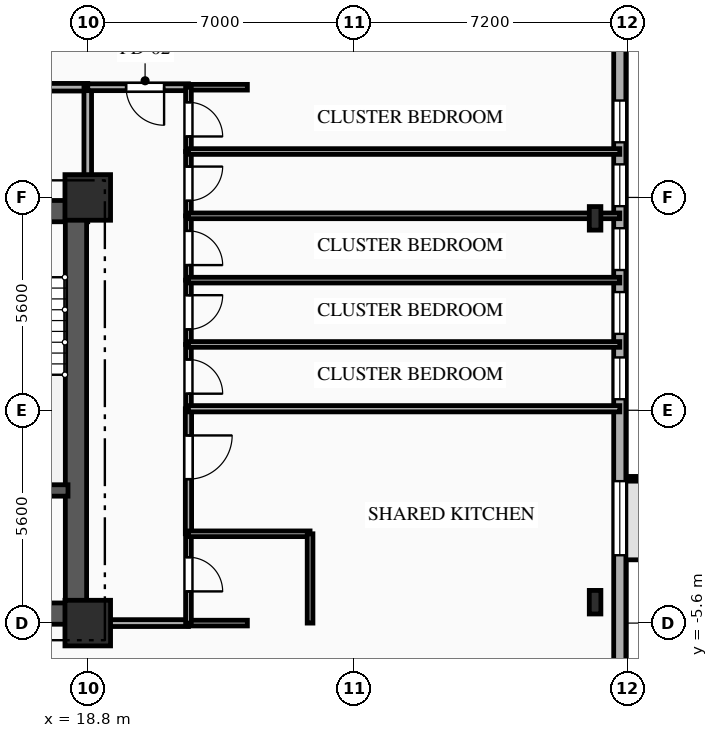
"""IFC4 building model, lengths in metres.
Left out: names, types, materials, properties, quantities, classifications, styles, units other than length and angle.
Written with IfcOpenShell. Run it as: python <this file> out.ifc"""

import sys

from ifc_helpers import new_model, si_unit, direction, frame, frame_2d, origin, origin_2d, place, context, subcontext, project, spatial, rectangle, i_section, extrude, element, fill, save


model = new_model("IFC4")
c1 = context("Model", 3, precision=1e-05, world=origin(), true_north=direction((0.0, 1.0)))
c2 = subcontext(c1, "Body", "Model", "MODEL_VIEW")
j1 = project(units=[si_unit("LENGTHUNIT", "METRE"), si_unit("PLANEANGLEUNIT", "RADIAN")], contexts=[c1])
p1 = place(None, origin())
s1 = spatial("IfcSite", under=j1, at=p1, CompositionType="ELEMENT")
p2 = place(p1, origin())
s2 = spatial("IfcBuilding", under=s1, at=p2, CompositionType="ELEMENT")
p3 = place(p2, frame((0.0, 0.0, 30.35)))
s3 = spatial("IfcBuildingStorey", under=s2, at=p3, CompositionType="ELEMENT", Elevation=30.35)
for number, where, z_axis, x_axis in (
    (1, (18.8, -5.6, 0.0), (0.0, 0.0, 1.0), (1.0, 0.0, 0.0)),
    (2, (18.8, 5.6, 0.0), (0.0, 0.0, 1.0), (1.0, 0.0, 0.0)),
):
    element("IfcColumn", number, at=place(p3, frame(where, z_axis=z_axis, x_axis=x_axis)), inside=s3, PredefinedType="COLUMN", context=c2, shape_type="SweptSolid", body=[
        extrude(rectangle(XDim=1.2, YDim=1.2, at=origin_2d()), origin(), (0.0, 0.0, 1.0), 3.35),
    ])
for number, where, z_axis, x_axis in (
    (3, (32.15, -5.05, 0.0), (0.0, 0.0, 1.0), (1.0, 0.0, 0.0)),
    (4, (32.15, 5.05, 0.0), (0.0, 0.0, 1.0), (1.0, 0.0, 0.0)),
):
    element("IfcColumn", number, at=place(p3, frame(where, z_axis=z_axis, x_axis=x_axis)), inside=s3, PredefinedType="COLUMN", context=c2, shape_type="SweptSolid", body=[
        extrude(i_section(OverallWidth=0.305, OverallDepth=0.62, WebThickness=0.021, FlangeThickness=0.04, FilletRadius=0.027, at=origin_2d()), origin(), (0.0, 0.0, 1.0), 3.35),
    ])
p4 = place(p3, frame((32.8, 15.8, 0.0), z_axis=(0.0, 0.0, 1.0), x_axis=(0.0, -1.0, 0.0)))
e5 = element("IfcWall", 5, at=p4, inside=s3, PredefinedType="SOLIDWALL", context=c2, shape_type="SweptSolid", body=[
    extrude(rectangle(XDim=31.6, YDim=0.32, at=frame_2d((15.8, 0.0))), origin(), (0.0, 0.0, 1.0), 3.035),
])
p5 = place(p4, frame((7.65, 0.0, 0.85)))
e6 = element("IfcOpeningElement", 6, at=p5, cuts=e5, PredefinedType="OPENING", context=c2, shape_type="SweptSolid", body=[
    extrude(rectangle(XDim=1.1, YDim=1.85, at=frame_2d((0.55, 0.925))), frame((0.0, 0.17, 0.0), z_axis=(0.0, -1.0, 0.0), x_axis=(1.0, 0.0, 0.0)), (0.0, 0.0, 1.0), 0.34),
])
p6 = place(p4, frame((9.33, 0.0, 0.85)))
e7 = element("IfcOpeningElement", 7, at=p6, cuts=e5, PredefinedType="OPENING", context=c2, shape_type="SweptSolid", body=[
    extrude(rectangle(XDim=1.1, YDim=1.85, at=frame_2d((0.55, 0.925))), frame((0.0, 0.17, 0.0), z_axis=(0.0, -1.0, 0.0), x_axis=(1.0, 0.0, 0.0)), (0.0, 0.0, 1.0), 0.34),
])
p7 = place(p4, frame((11.01, 0.0, 0.85)))
e8 = element("IfcOpeningElement", 8, at=p7, cuts=e5, PredefinedType="OPENING", context=c2, shape_type="SweptSolid", body=[
    extrude(rectangle(XDim=1.1, YDim=1.85, at=frame_2d((0.55, 0.925))), frame((0.0, 0.17, 0.0), z_axis=(0.0, -1.0, 0.0), x_axis=(1.0, 0.0, 0.0)), (0.0, 0.0, 1.0), 0.34),
])
p8 = place(p4, frame((12.69, 0.0, 0.85)))
e9 = element("IfcOpeningElement", 9, at=p8, cuts=e5, PredefinedType="OPENING", context=c2, shape_type="SweptSolid", body=[
    extrude(rectangle(XDim=1.1, YDim=1.85, at=frame_2d((0.55, 0.925))), frame((0.0, 0.17, 0.0), z_axis=(0.0, -1.0, 0.0), x_axis=(1.0, 0.0, 0.0)), (0.0, 0.0, 1.0), 0.34),
])
p9 = place(p4, frame((14.41, 0.0, 0.85)))
e10 = element("IfcOpeningElement", 10, at=p9, cuts=e5, PredefinedType="OPENING", context=c2, shape_type="SweptSolid", body=[
    extrude(rectangle(XDim=1.1, YDim=1.85, at=frame_2d((0.55, 0.925))), frame((0.0, 0.17, 0.0), z_axis=(0.0, -1.0, 0.0), x_axis=(1.0, 0.0, 0.0)), (0.0, 0.0, 1.0), 0.34),
])
p10 = place(p4, frame((17.665, 0.0, 0.85)))
e11 = element("IfcOpeningElement", 11, at=p10, cuts=e5, PredefinedType="OPENING", context=c2, shape_type="SweptSolid", body=[
    extrude(rectangle(XDim=1.95, YDim=1.85, at=frame_2d((0.975, 0.925))), frame((0.0, 0.17, 0.0), z_axis=(0.0, -1.0, 0.0), x_axis=(1.0, 0.0, 0.0)), (0.0, 0.0, 1.0), 0.34),
])
p11 = place(p3, frame((9.2, 5.24, 0.0), z_axis=(0.0, 0.0, 1.0), x_axis=(1.0, 0.0, 0.0)))
e12 = element("IfcWall", 12, at=p11, inside=s3, PredefinedType="SHEAR", context=c2, shape_type="SweptSolid", body=[
    extrude(rectangle(XDim=9.6, YDim=0.56, at=frame_2d((4.8, 0.0))), origin(), (0.0, 0.0, 1.0), 3.035),
])
p12 = place(p11, frame((6.95, 0.0, 0.0)))
e13 = element("IfcOpeningElement", 13, at=p12, cuts=e12, PredefinedType="OPENING", context=c2, shape_type="SweptSolid", body=[
    extrude(rectangle(XDim=1.1, YDim=2.15, at=frame_2d((0.55, 1.075))), frame((0.0, 0.29, 0.0), z_axis=(0.0, -1.0, 0.0), x_axis=(1.0, 0.0, 0.0)), (0.0, 0.0, 1.0), 0.58),
])
p13 = place(p11, frame((3.775, 0.0, 0.0)))
e14 = element("IfcOpeningElement", 14, at=p13, cuts=e12, PredefinedType="OPENING", context=c2, shape_type="SweptSolid", body=[
    extrude(rectangle(XDim=1.05, YDim=2.1, at=frame_2d((0.525, 1.05))), frame((0.0, 0.29, 0.0), z_axis=(0.0, -1.0, 0.0), x_axis=(1.0, 0.0, 0.0)), (0.0, 0.0, 1.0), 0.58),
])
p14 = place(p3, frame((9.2, -5.35, 0.0), z_axis=(0.0, 0.0, 1.0), x_axis=(1.0, 0.0, 0.0)))
e15 = element("IfcWall", 15, at=p14, inside=s3, PredefinedType="SHEAR", context=c2, shape_type="SweptSolid", body=[
    extrude(rectangle(XDim=9.6, YDim=0.56, at=frame_2d((4.8, 0.0))), origin(), (0.0, 0.0, 1.0), 3.035),
])
p15 = place(p14, frame((7.65, 0.0, 0.0)))
e16 = element("IfcOpeningElement", 16, at=p15, cuts=e15, PredefinedType="OPENING", context=c2, shape_type="SweptSolid", body=[
    extrude(rectangle(XDim=0.9, YDim=2.1, at=frame_2d((0.45, 1.05))), frame((0.0, 0.29, 0.0), z_axis=(0.0, -1.0, 0.0), x_axis=(1.0, 0.0, 0.0)), (0.0, 0.0, 1.0), 0.58),
])
p16 = place(p3, frame((18.49, -5.05, 0.0), z_axis=(0.0, 0.0, 1.0), x_axis=(0.0, 1.0, 0.0)))
e17 = element("IfcWall", 17, at=p16, inside=s3, PredefinedType="SHEAR", context=c2, shape_type="SweptSolid", body=[
    extrude(rectangle(XDim=10.1, YDim=0.56, at=frame_2d((5.05, 0.0))), origin(), (0.0, 0.0, 1.0), 3.035),
])
p17 = place(p3, frame((15.1, -2.11, 0.0), z_axis=(0.0, 0.0, 1.0), x_axis=(1.0, 0.0, 0.0)))
e18 = element("IfcWall", 18, at=p17, inside=s3, PredefinedType="SHEAR", context=c2, shape_type="SweptSolid", body=[
    extrude(rectangle(XDim=3.18, YDim=0.3, at=frame_2d((1.59, 0.0))), origin(), (0.0, 0.0, 1.0), 3.035),
])
p18 = place(p3, frame((18.8, 8.5, 0.0), z_axis=(0.0, 0.0, 1.0), x_axis=(-1.0, 0.0, 0.0)))
e19 = element("IfcWall", 19, at=p18, inside=s3, PredefinedType="PARTITIONING", context=c2, shape_type="SweptSolid", body=[
    extrude(rectangle(XDim=6.8, YDim=0.2, at=frame_2d((3.4, 0.0))), origin(), (0.0, 0.0, 1.0), 3.035),
])
p19 = place(p18, frame((3.985, 0.0, 0.0)))
e20 = element("IfcOpeningElement", 20, at=p19, cuts=e19, PredefinedType="OPENING", context=c2, shape_type="SweptSolid", body=[
    extrude(rectangle(XDim=1.1, YDim=2.15, at=frame_2d((0.55, 1.075))), frame((0.0, 0.11, 0.0), z_axis=(0.0, -1.0, 0.0), x_axis=(1.0, 0.0, 0.0)), (0.0, 0.0, 1.0), 0.22),
])
p20 = place(p3, frame((18.8, 5.6, 0.0), z_axis=(0.0, 0.0, 1.0), x_axis=(0.0, 1.0, 0.0)))
e21 = element("IfcWall", 21, at=p20, inside=s3, PredefinedType="PARTITIONING", context=c2, shape_type="SweptSolid", body=[
    extrude(rectangle(XDim=2.9, YDim=0.2, at=frame_2d((1.45, 0.0))), origin(), (0.0, 0.0, 1.0), 2.52),
])
p21 = place(p3, frame((21.45, 8.5, 0.0), z_axis=(0.0, 0.0, 1.0), x_axis=(-1.0, 0.0, 0.0)))
e22 = element("IfcWall", 22, at=p21, inside=s3, PredefinedType="PARTITIONING", context=c2, shape_type="SweptSolid", body=[
    extrude(rectangle(XDim=2.65, YDim=0.18, at=frame_2d((1.325, 0.0))), origin(), (0.0, 0.0, 1.0), 3.035),
])
p22 = place(p21, frame((0.641, 0.0, 0.0)))
e23 = element("IfcOpeningElement", 23, at=p22, cuts=e22, PredefinedType="OPENING", context=c2, shape_type="SweptSolid", body=[
    extrude(rectangle(XDim=1.0, YDim=2.15, at=frame_2d((0.5, 1.075))), frame((0.0, 0.1, 0.0), z_axis=(0.0, -1.0, 0.0), x_axis=(1.0, 0.0, 0.0)), (0.0, 0.0, 1.0), 0.2),
])
p23 = place(p3, frame((23.0, 8.5, 0.0), z_axis=(0.0, 0.0, 1.0), x_axis=(-1.0, 0.0, 0.0)))
e24 = element("IfcWall", 24, at=p23, inside=s3, PredefinedType="PARTITIONING", context=c2, shape_type="SweptSolid", body=[
    extrude(rectangle(XDim=1.55, YDim=0.15, at=frame_2d((0.775, 0.0))), origin(), (0.0, 0.0, 1.0), 3.035),
])
p24 = place(p3, frame((18.8, -5.6, 0.0), z_axis=(0.0, 0.0, 1.0), x_axis=(1.0, 0.0, 0.0)))
e25 = element("IfcWall", 25, at=p24, inside=s3, PredefinedType="PARTITIONING", context=c2, shape_type="SweptSolid", body=[
    extrude(rectangle(XDim=2.65, YDim=0.18, at=frame_2d((1.325, 0.0))), origin(), (0.0, 0.0, 1.0), 3.035),
])
p25 = place(p3, frame((21.45, -5.6, 0.0), z_axis=(0.0, 0.0, 1.0), x_axis=(1.0, 0.0, 0.0)))
e26 = element("IfcWall", 26, at=p25, inside=s3, PredefinedType="PLUMBINGWALL", context=c2, shape_type="SweptSolid", body=[
    extrude(rectangle(XDim=1.55, YDim=0.15, at=frame_2d((0.775, 0.0))), origin(), (0.0, 0.0, 1.0), 3.035),
])
p26 = place(p3, frame((21.45, -3.25, 0.0), z_axis=(0.0, 0.0, 1.0), x_axis=(0.0, -1.0, 0.0)))
e27 = element("IfcWall", 27, at=p26, inside=s3, PredefinedType="PLUMBINGWALL", context=c2, shape_type="SweptSolid", body=[
    extrude(rectangle(XDim=2.35, YDim=0.15, at=frame_2d((1.175, 0.0))), origin(), (0.0, 0.0, 1.0), 3.035),
])
p27 = place(p26, frame((0.616, 0.0, 0.0)))
e28 = element("IfcOpeningElement", 28, at=p27, cuts=e27, PredefinedType="OPENING", context=c2, shape_type="SweptSolid", body=[
    extrude(rectangle(XDim=0.9, YDim=2.1, at=frame_2d((0.45, 1.05))), frame((0.0, 0.085, 0.0), z_axis=(0.0, -1.0, 0.0), x_axis=(1.0, 0.0, 0.0)), (0.0, 0.0, 1.0), 0.17),
])
p28 = place(p3, frame((21.45, 0.04, 0.0), z_axis=(0.0, 0.0, 1.0), x_axis=(0.0, -1.0, 0.0)))
e29 = element("IfcWall", 29, at=p28, inside=s3, PredefinedType="PARTITIONING", context=c2, shape_type="SweptSolid", body=[
    extrude(rectangle(XDim=3.29, YDim=0.165, at=frame_2d((1.645, 0.0))), origin(), (0.0, 0.0, 1.0), 3.035),
])
p29 = place(p28, frame((0.702, 0.0, 0.0)))
e30 = element("IfcOpeningElement", 30, at=p29, cuts=e29, PredefinedType="OPENING", context=c2, shape_type="SweptSolid", body=[
    extrude(rectangle(XDim=1.15, YDim=2.15, at=frame_2d((0.575, 1.075))), frame((0.0, 0.093, 0.0), z_axis=(0.0, -1.0, 0.0), x_axis=(1.0, 0.0, 0.0)), (0.0, 0.0, 1.0), 0.185),
])
p30 = place(p3, frame((21.45, 1.732, 0.0), z_axis=(0.0, 0.0, 1.0), x_axis=(0.0, -1.0, 0.0)))
e31 = element("IfcWall", 31, at=p30, inside=s3, PredefinedType="PARTITIONING", context=c2, shape_type="SweptSolid", body=[
    extrude(rectangle(XDim=1.692, YDim=0.15, at=frame_2d((0.846, 0.0))), origin(), (0.0, 0.0, 1.0), 3.035),
])
p31 = place(p30, frame((0.396, 0.0, 0.0)))
e32 = element("IfcOpeningElement", 32, at=p31, cuts=e31, PredefinedType="OPENING", context=c2, shape_type="SweptSolid", body=[
    extrude(rectangle(XDim=0.9, YDim=2.1, at=frame_2d((0.45, 1.05))), frame((0.0, 0.085, 0.0), z_axis=(0.0, -1.0, 0.0), x_axis=(1.0, 0.0, 0.0)), (0.0, 0.0, 1.0), 0.17),
])
p32 = place(p3, frame((21.45, 3.424, 0.0), z_axis=(0.0, 0.0, 1.0), x_axis=(0.0, -1.0, 0.0)))
e33 = element("IfcWall", 33, at=p32, inside=s3, PredefinedType="PARTITIONING", context=c2, shape_type="SweptSolid", body=[
    extrude(rectangle(XDim=1.692, YDim=0.15, at=frame_2d((0.846, 0.0))), origin(), (0.0, 0.0, 1.0), 3.035),
])
p33 = place(p32, frame((0.396, 0.0, 0.0)))
e34 = element("IfcOpeningElement", 34, at=p33, cuts=e33, PredefinedType="OPENING", context=c2, shape_type="SweptSolid", body=[
    extrude(rectangle(XDim=0.9, YDim=2.1, at=frame_2d((0.45, 1.05))), frame((0.0, 0.085, 0.0), z_axis=(0.0, -1.0, 0.0), x_axis=(1.0, 0.0, 0.0)), (0.0, 0.0, 1.0), 0.17),
])
p34 = place(p3, frame((21.45, 5.116, 0.0), z_axis=(0.0, 0.0, 1.0), x_axis=(0.0, -1.0, 0.0)))
e35 = element("IfcWall", 35, at=p34, inside=s3, PredefinedType="PARTITIONING", context=c2, shape_type="SweptSolid", body=[
    extrude(rectangle(XDim=1.692, YDim=0.15, at=frame_2d((0.846, 0.0))), origin(), (0.0, 0.0, 1.0), 3.035),
])
p35 = place(p34, frame((0.396, 0.0, 0.0)))
e36 = element("IfcOpeningElement", 36, at=p35, cuts=e35, PredefinedType="OPENING", context=c2, shape_type="SweptSolid", body=[
    extrude(rectangle(XDim=0.9, YDim=2.1, at=frame_2d((0.45, 1.05))), frame((0.0, 0.085, 0.0), z_axis=(0.0, -1.0, 0.0), x_axis=(1.0, 0.0, 0.0)), (0.0, 0.0, 1.0), 0.17),
])
p36 = place(p3, frame((21.45, 6.808, 0.0), z_axis=(0.0, 0.0, 1.0), x_axis=(0.0, -1.0, 0.0)))
e37 = element("IfcWall", 37, at=p36, inside=s3, PredefinedType="PARTITIONING", context=c2, shape_type="SweptSolid", body=[
    extrude(rectangle(XDim=1.692, YDim=0.15, at=frame_2d((0.846, 0.0))), origin(), (0.0, 0.0, 1.0), 3.035),
])
p37 = place(p36, frame((0.396, 0.0, 0.0)))
e38 = element("IfcOpeningElement", 38, at=p37, cuts=e37, PredefinedType="OPENING", context=c2, shape_type="SweptSolid", body=[
    extrude(rectangle(XDim=0.9, YDim=2.1, at=frame_2d((0.45, 1.05))), frame((0.0, 0.085, 0.0), z_axis=(0.0, -1.0, 0.0), x_axis=(1.0, 0.0, 0.0)), (0.0, 0.0, 1.0), 0.17),
])
p38 = place(p3, frame((21.45, 8.5, 0.0), z_axis=(0.0, 0.0, 1.0), x_axis=(0.0, -1.0, 0.0)))
e39 = element("IfcWall", 39, at=p38, inside=s3, PredefinedType="PARTITIONING", context=c2, shape_type="SweptSolid", body=[
    extrude(rectangle(XDim=1.692, YDim=0.15, at=frame_2d((0.846, 0.0))), origin(), (0.0, 0.0, 1.0), 3.035),
])
p39 = place(p38, frame((0.396, 0.0, 0.0)))
e40 = element("IfcOpeningElement", 40, at=p39, cuts=e39, PredefinedType="OPENING", context=c2, shape_type="SweptSolid", body=[
    extrude(rectangle(XDim=0.9, YDim=2.1, at=frame_2d((0.45, 1.05))), frame((0.0, 0.085, 0.0), z_axis=(0.0, -1.0, 0.0), x_axis=(1.0, 0.0, 0.0)), (0.0, 0.0, 1.0), 0.17),
])
p40 = place(p3, frame((21.45, -3.25, 0.0), z_axis=(0.0, 0.0, 1.0), x_axis=(1.0, 0.0, 0.0)))
e41 = element("IfcWall", 41, at=p40, inside=s3, PredefinedType="PLUMBINGWALL", context=c2, shape_type="SweptSolid", body=[
    extrude(rectangle(XDim=3.2, YDim=0.15, at=frame_2d((1.6, 0.0))), origin(), (0.0, 0.0, 1.0), 2.52),
])
p41 = place(p3, frame((24.65, -3.25, 0.0), z_axis=(0.0, 0.0, 1.0), x_axis=(0.0, -1.0, 0.0)))
e42 = element("IfcWall", 42, at=p41, inside=s3, PredefinedType="PLUMBINGWALL", context=c2, shape_type="SweptSolid", body=[
    extrude(rectangle(XDim=2.35, YDim=0.15, at=frame_2d((1.175, 0.0))), origin(), (0.0, 0.0, 1.0), 3.035),
])
p42 = place(p3, frame((21.45, 0.04, 0.0), z_axis=(0.0, 0.0, 1.0), x_axis=(1.0, 0.0, 0.0)))
e43 = element("IfcWall", 43, at=p42, inside=s3, PredefinedType="PARTITIONING", context=c2, shape_type="SweptSolid", body=[
    extrude(rectangle(XDim=11.35, YDim=0.165, at=frame_2d((5.675, 0.0))), origin(), (0.0, 0.0, 1.0), 3.035),
])
p43 = place(p3, frame((21.45, 1.732, 0.0), z_axis=(0.0, 0.0, 1.0), x_axis=(1.0, 0.0, 0.0)))
e44 = element("IfcWall", 44, at=p43, inside=s3, PredefinedType="PARTITIONING", context=c2, shape_type="SweptSolid", body=[
    extrude(rectangle(XDim=11.35, YDim=0.15, at=frame_2d((5.675, 0.0))), origin(), (0.0, 0.0, 1.0), 3.035),
])
for number, where, z_axis, x_axis in (
    (45, (21.45, 3.424, 0.0), (0.0, 0.0, 1.0), (1.0, 0.0, 0.0)),
    (46, (21.45, 5.116, 0.0), (0.0, 0.0, 1.0), (1.0, 0.0, 0.0)),
):
    element("IfcWall", number, at=place(p3, frame(where, z_axis=z_axis, x_axis=x_axis)), inside=s3, PredefinedType="PARTITIONING", context=c2, shape_type="SweptSolid", body=[
        extrude(rectangle(XDim=11.35, YDim=0.15, at=frame_2d((5.675, 0.0))), origin(), (0.0, 0.0, 1.0), 2.52),
    ])
p44 = place(p3, frame((21.45, 6.808, 0.0), z_axis=(0.0, 0.0, 1.0), x_axis=(1.0, 0.0, 0.0)))
e47 = element("IfcWall", 47, at=p44, inside=s3, PredefinedType="PARTITIONING", context=c2, shape_type="SweptSolid", body=[
    extrude(rectangle(XDim=11.35, YDim=0.15, at=frame_2d((5.675, 0.0))), origin(), (0.0, 0.0, 1.0), 3.035),
])
p45 = place(p5, origin())
e48 = element("IfcWindow", 48, at=p45, inside=s3, PartitioningType="SINGLE_PANEL", PredefinedType="WINDOW", context=c2, shape_type="SweptSolid", body=[
    extrude(rectangle(XDim=1.1, YDim=1.85, at=frame_2d((0.55, 0.925))), frame((0.0, 0.03, 0.0), z_axis=(0.0, -1.0, 0.0), x_axis=(1.0, 0.0, 0.0)), (0.0, 0.0, 1.0), 0.06),
])
fill(e6, e48)
p46 = place(p6, origin())
e49 = element("IfcWindow", 49, at=p46, inside=s3, PartitioningType="SINGLE_PANEL", PredefinedType="WINDOW", context=c2, shape_type="SweptSolid", body=[
    extrude(rectangle(XDim=1.1, YDim=1.85, at=frame_2d((0.55, 0.925))), frame((0.0, 0.03, 0.0), z_axis=(0.0, -1.0, 0.0), x_axis=(1.0, 0.0, 0.0)), (0.0, 0.0, 1.0), 0.06),
])
fill(e7, e49)
p47 = place(p7, origin())
e50 = element("IfcWindow", 50, at=p47, inside=s3, PartitioningType="SINGLE_PANEL", PredefinedType="WINDOW", context=c2, shape_type="SweptSolid", body=[
    extrude(rectangle(XDim=1.1, YDim=1.85, at=frame_2d((0.55, 0.925))), frame((0.0, 0.03, 0.0), z_axis=(0.0, -1.0, 0.0), x_axis=(1.0, 0.0, 0.0)), (0.0, 0.0, 1.0), 0.06),
])
fill(e8, e50)
p48 = place(p8, origin())
e51 = element("IfcWindow", 51, at=p48, inside=s3, PartitioningType="SINGLE_PANEL", PredefinedType="WINDOW", context=c2, shape_type="SweptSolid", body=[
    extrude(rectangle(XDim=1.1, YDim=1.85, at=frame_2d((0.55, 0.925))), frame((0.0, 0.03, 0.0), z_axis=(0.0, -1.0, 0.0), x_axis=(1.0, 0.0, 0.0)), (0.0, 0.0, 1.0), 0.06),
])
fill(e9, e51)
p49 = place(p9, origin())
e52 = element("IfcWindow", 52, at=p49, inside=s3, PartitioningType="SINGLE_PANEL", PredefinedType="WINDOW", context=c2, shape_type="SweptSolid", body=[
    extrude(rectangle(XDim=1.1, YDim=1.85, at=frame_2d((0.55, 0.925))), frame((0.0, 0.03, 0.0), z_axis=(0.0, -1.0, 0.0), x_axis=(1.0, 0.0, 0.0)), (0.0, 0.0, 1.0), 0.06),
])
fill(e10, e52)
p50 = place(p10, origin())
e53 = element("IfcWindow", 53, at=p50, inside=s3, PartitioningType="SINGLE_PANEL", PredefinedType="WINDOW", context=c2, shape_type="SweptSolid", body=[
    extrude(rectangle(XDim=1.95, YDim=1.85, at=frame_2d((0.975, 0.925))), frame((0.0, 0.03, 0.0), z_axis=(0.0, -1.0, 0.0), x_axis=(1.0, 0.0, 0.0)), (0.0, 0.0, 1.0), 0.06),
])
fill(e11, e53)
p51 = place(p22, origin())
e54 = element("IfcDoor", 54, at=p51, inside=s3, OperationType="SINGLE_SWING_LEFT", PredefinedType="DOOR", context=c2, shape_type="SweptSolid", body=[
    extrude(rectangle(XDim=1.0, YDim=2.15, at=frame_2d((0.5, 1.075))), frame((0.0, 0.025, 0.0), z_axis=(0.0, -1.0, 0.0), x_axis=(1.0, 0.0, 0.0)), (0.0, 0.0, 1.0), 0.05),
])
fill(e23, e54)
p52 = place(p27, origin())
e55 = element("IfcDoor", 55, at=p52, inside=s3, OperationType="SINGLE_SWING_RIGHT", PredefinedType="DOOR", context=c2, shape_type="SweptSolid", body=[
    extrude(rectangle(XDim=0.9, YDim=2.1, at=frame_2d((0.45, 1.05))), frame((0.0, 0.025, 0.0), z_axis=(0.0, -1.0, 0.0), x_axis=(1.0, 0.0, 0.0)), (0.0, 0.0, 1.0), 0.05),
])
fill(e28, e55)
p53 = place(p29, origin())
e56 = element("IfcDoor", 56, at=p53, inside=s3, OperationType="SINGLE_SWING_LEFT", PredefinedType="DOOR", context=c2, shape_type="SweptSolid", body=[
    extrude(rectangle(XDim=1.15, YDim=2.15, at=frame_2d((0.575, 1.075))), frame((0.0, 0.025, 0.0), z_axis=(0.0, -1.0, 0.0), x_axis=(1.0, 0.0, 0.0)), (0.0, 0.0, 1.0), 0.05),
])
fill(e30, e56)
p54 = place(p31, origin())
e57 = element("IfcDoor", 57, at=p54, inside=s3, OperationType="SINGLE_SWING_RIGHT", PredefinedType="DOOR", context=c2, shape_type="SweptSolid", body=[
    extrude(rectangle(XDim=0.9, YDim=2.1, at=frame_2d((0.45, 1.05))), frame((0.0, 0.025, 0.0), z_axis=(0.0, -1.0, 0.0), x_axis=(1.0, 0.0, 0.0)), (0.0, 0.0, 1.0), 0.05),
])
fill(e32, e57)
p55 = place(p33, origin())
e58 = element("IfcDoor", 58, at=p55, inside=s3, OperationType="SINGLE_SWING_LEFT", PredefinedType="DOOR", context=c2, shape_type="SweptSolid", body=[
    extrude(rectangle(XDim=0.9, YDim=2.1, at=frame_2d((0.45, 1.05))), frame((0.0, 0.025, 0.0), z_axis=(0.0, -1.0, 0.0), x_axis=(1.0, 0.0, 0.0)), (0.0, 0.0, 1.0), 0.05),
])
fill(e34, e58)
p56 = place(p35, origin())
e59 = element("IfcDoor", 59, at=p56, inside=s3, OperationType="SINGLE_SWING_RIGHT", PredefinedType="DOOR", context=c2, shape_type="SweptSolid", body=[
    extrude(rectangle(XDim=0.9, YDim=2.1, at=frame_2d((0.45, 1.05))), frame((0.0, 0.025, 0.0), z_axis=(0.0, -1.0, 0.0), x_axis=(1.0, 0.0, 0.0)), (0.0, 0.0, 1.0), 0.05),
])
fill(e36, e59)
p57 = place(p37, origin())
e60 = element("IfcDoor", 60, at=p57, inside=s3, OperationType="SINGLE_SWING_LEFT", PredefinedType="DOOR", context=c2, shape_type="SweptSolid", body=[
    extrude(rectangle(XDim=0.9, YDim=2.1, at=frame_2d((0.45, 1.05))), frame((0.0, 0.025, 0.0), z_axis=(0.0, -1.0, 0.0), x_axis=(1.0, 0.0, 0.0)), (0.0, 0.0, 1.0), 0.05),
])
fill(e38, e60)
p58 = place(p39, origin())
e61 = element("IfcDoor", 61, at=p58, inside=s3, OperationType="SINGLE_SWING_RIGHT", PredefinedType="DOOR", context=c2, shape_type="SweptSolid", body=[
    extrude(rectangle(XDim=0.9, YDim=2.1, at=frame_2d((0.45, 1.05))), frame((0.0, 0.025, 0.0), z_axis=(0.0, -1.0, 0.0), x_axis=(1.0, 0.0, 0.0)), (0.0, 0.0, 1.0), 0.05),
])
fill(e40, e61)
save(model, sys.argv[1])
